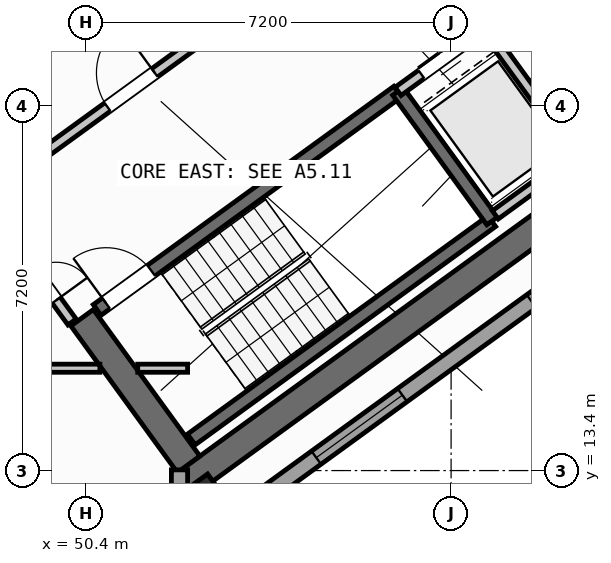
"""IFC4 building model, lengths in metres.
Left out: names, types, materials, properties, quantities, classifications, styles, units other than length and angle.
Written with IfcOpenShell. Run it as: python <this file> out.ifc"""

import sys

from ifc_helpers import new_model, si_unit, direction, frame, frame_2d, origin, origin_2d, place, context, subcontext, project, spatial, rectangle, hollow_rectangle, extrude, source, transform, mapped, element, fill, save


model = new_model("IFC4")
c1 = context("Model", 3, precision=1e-05, world=origin(), true_north=direction((0.0, 1.0)))
c2 = subcontext(c1, "Body", "Model", "MODEL_VIEW")
j1 = project(units=[si_unit("LENGTHUNIT", "METRE"), si_unit("PLANEANGLEUNIT", "RADIAN")], contexts=[c1])
p1 = place(None, origin())
s1 = spatial("IfcSite", under=j1, at=p1, CompositionType="ELEMENT")
p2 = place(p1, origin())
s2 = spatial("IfcBuilding", under=s1, at=p2, CompositionType="ELEMENT")
p3 = place(p2, frame((0.0, 0.0, 187.8)))
s3 = spatial("IfcBuildingStorey", under=s2, at=p3, CompositionType="ELEMENT", Elevation=187.8)
p4 = place(p3, frame((52.359, 13.14, 0.0), z_axis=(0.0, 0.0, 1.0), x_axis=(0.809014896919, 0.587788139183, 0.0)))
e1 = element("IfcWall", 1, at=p4, inside=s3, PredefinedType="SHEAR", context=c2, shape_type="SweptSolid", body=[
    extrude(rectangle(XDim=12.34, YDim=0.55, at=frame_2d((6.17, 0.0))), origin(), (0.0, 0.0, 1.0), 3.35),
])
p5 = place(p3, frame((52.42, 13.524, 0.0), z_axis=(0.0, 0.0, 1.0), x_axis=(-0.587802113096, 0.809004744015, 0.0)))
e2 = element("IfcWall", 2, at=p5, inside=s3, PredefinedType="SHEAR", context=c2, shape_type="SweptSolid", body=[
    extrude(rectangle(XDim=3.575, YDim=0.55, at=frame_2d((1.788, 0.0))), origin(), (0.0, 0.0, 1.0), 3.35),
])
m1 = source(origin(), c2, "Body", "SweptSolid", [
    extrude(hollow_rectangle(XDim=0.8, YDim=0.8, WallThickness=0.032, at=origin_2d()), origin(), (0.0, 0.0, 1.0), 3.6),
])
p6 = place(p3, frame((52.705, 12.773, 0.0), z_axis=(0.0, 0.0, 1.0), x_axis=(0.809016994375, 0.587785252292, 0.0)))
e3 = element("IfcColumn", 3, at=p6, inside=s3, PredefinedType="COLUMN", context=c2, shape_type="MappedRepresentation", body=[
    mapped(m1, transform((0.0, 0.0, 0.0), scale=1.0)),
])
p7 = place(p3, frame((67.454, 22.747, 0.0), z_axis=(0.0, 0.0, 1.0), x_axis=(-0.809021120468, -0.587779573171, 0.0)))
e4 = element("IfcWall", 4, at=p7, inside=s3, PredefinedType="STANDARD", context=c2, shape_type="SweptSolid", body=[
    extrude(rectangle(XDim=17.588, YDim=0.32, at=frame_2d((8.794, 0.0))), origin(), (0.0, 0.0, 1.0), 3.35),
])
p8 = place(p7, frame((1.624, 0.0, 0.0)))
e5 = element("IfcOpeningElement", 5, at=p8, cuts=e4, PredefinedType="OPENING", context=c2, shape_type="SweptSolid", body=[
    extrude(rectangle(XDim=1.05, YDim=2.15, at=frame_2d((0.525, 1.075))), frame((0.0, 0.17, 0.0), z_axis=(0.0, -1.0, 0.0), x_axis=(1.0, 0.0, 0.0)), (0.0, 0.0, 1.0), 0.34),
])
p9 = place(p7, frame((8.119, 0.0, 0.8)))
e6 = element("IfcOpeningElement", 6, at=p9, cuts=e4, PredefinedType="OPENING", context=c2, shape_type="SweptSolid", body=[
    extrude(rectangle(XDim=2.1, YDim=1.55, at=frame_2d((1.05, 0.775))), frame((0.0, 0.17, 0.0), z_axis=(0.0, -1.0, 0.0), x_axis=(1.0, 0.0, 0.0)), (0.0, 0.0, 1.0), 0.34),
])
p10 = place(p7, frame((13.369, 0.0, 0.8)))
e7 = element("IfcOpeningElement", 7, at=p10, cuts=e4, PredefinedType="OPENING", context=c2, shape_type="SweptSolid", body=[
    extrude(rectangle(XDim=2.1, YDim=1.55, at=frame_2d((1.05, 0.775))), frame((0.0, 0.17, 0.0), z_axis=(0.0, -1.0, 0.0), x_axis=(1.0, 0.0, 0.0)), (0.0, 0.0, 1.0), 0.34),
])
p11 = place(p3, frame((52.24, 13.414, 0.0), z_axis=(0.0, 0.0, 1.0), x_axis=(0.0, -1.0, 0.0)))
e8 = element("IfcWall", 8, at=p11, inside=s3, PredefinedType="STANDARD", context=c2, shape_type="SweptSolid", body=[
    extrude(rectangle(XDim=9.948, YDim=0.32, at=frame_2d((4.974, 0.0))), origin(), (0.0, 0.0, 1.0), 3.35),
])
p12 = place(p11, frame((2.296, 0.0, 0.8)))
e9 = element("IfcOpeningElement", 9, at=p12, cuts=e8, PredefinedType="OPENING", context=c2, shape_type="SweptSolid", body=[
    extrude(rectangle(XDim=2.1, YDim=1.55, at=frame_2d((1.05, 0.775))), frame((0.0, 0.17, 0.0), z_axis=(0.0, -1.0, 0.0), x_axis=(1.0, 0.0, 0.0)), (0.0, 0.0, 1.0), 0.34),
])
p13 = place(p11, frame((7.033, 0.0, 0.85)))
e10 = element("IfcOpeningElement", 10, at=p13, cuts=e8, PredefinedType="OPENING", context=c2, shape_type="SweptSolid", body=[
    extrude(rectangle(XDim=1.8, YDim=1.5, at=frame_2d((0.9, 0.75))), frame((0.0, 0.17, 0.0), z_axis=(0.0, -1.0, 0.0), x_axis=(1.0, 0.0, 0.0)), (0.0, 0.0, 1.0), 0.34),
])
p14 = place(p3, frame((52.472, 14.013, 0.0), z_axis=(0.0, 0.0, 1.0), x_axis=(0.809028366311, 0.587769599847, 0.0)))
e11 = element("IfcWall", 11, at=p14, inside=s3, PredefinedType="SHEAR", context=c2, shape_type="SweptSolid", body=[
    extrude(rectangle(XDim=7.33, YDim=0.26, at=frame_2d((3.665, 0.0))), origin(), (0.0, 0.0, 1.0), 3.35),
])
p15 = place(p3, frame((50.615, 16.57, 0.0), z_axis=(0.0, 0.0, 1.0), x_axis=(0.809028366311, 0.587769599847, 0.0)))
e12 = element("IfcWall", 12, at=p15, inside=s3, PredefinedType="SHEAR", context=c2, shape_type="SweptSolid", body=[
    extrude(rectangle(XDim=7.33, YDim=0.26, at=frame_2d((3.665, 0.0))), origin(), (0.0, 0.0, 1.0), 3.35),
])
p16 = place(p15, frame((0.22, 0.0, 0.0)))
e13 = element("IfcOpeningElement", 13, at=p16, cuts=e12, PredefinedType="OPENING", context=c2, shape_type="SweptSolid", body=[
    extrude(rectangle(XDim=1.1, YDim=2.1, at=frame_2d((0.55, 1.05))), frame((0.0, 0.14, 0.0), z_axis=(0.0, -1.0, 0.0), x_axis=(1.0, 0.0, 0.0)), (0.0, 0.0, 1.0), 0.28),
])
p17 = place(p3, frame((58.41, 18.327, 0.0), z_axis=(0.0, 0.0, 1.0), x_axis=(-0.58776738483, 0.809029975545, 0.0)))
e14 = element("IfcWall", 14, at=p17, inside=s3, PredefinedType="SHEAR", context=c2, shape_type="SweptSolid", body=[
    extrude(rectangle(XDim=3.16, YDim=0.26, at=frame_2d((1.58, 0.0))), origin(), (0.0, 0.0, 1.0), 3.35),
])
p18 = place(p3, frame((47.065, 21.407, 0.0), z_axis=(0.0, 0.0, 1.0), x_axis=(0.809032984992, 0.587763242466, 0.0)))
e15 = element("IfcWall", 15, at=p18, inside=s3, PredefinedType="STANDARD", context=c2, shape_type="SweptSolid", body=[
    extrude(rectangle(XDim=3.448, YDim=0.2, at=frame_2d((1.724, 0.0))), origin(), (0.0, 0.0, 1.0), 3.34),
])
p19 = place(p18, frame((0.458, 0.0, 0.0)))
e16 = element("IfcOpeningElement", 16, at=p19, cuts=e15, PredefinedType="OPENING", context=c2, shape_type="SweptSolid", body=[
    extrude(rectangle(XDim=1.3, YDim=2.2, at=frame_2d((0.65, 1.1))), frame((0.0, 0.11, 0.0), z_axis=(0.0, -1.0, 0.0), x_axis=(1.0, 0.0, 0.0)), (0.0, 0.0, 1.0), 0.22),
])
p20 = place(p3, frame((48.758, 19.077, 0.0), z_axis=(0.0, 0.0, 1.0), x_axis=(0.809005065155, 0.587801671104, 0.0)))
e17 = element("IfcWall", 17, at=p20, inside=s3, PredefinedType="STANDARD", context=c2, shape_type="SweptSolid", body=[
    extrude(rectangle(XDim=5.768, YDim=0.2, at=frame_2d((2.884, 0.0))), origin(), (0.0, 0.0, 1.0), 3.34),
])
p21 = place(p20, frame((2.548, 0.0, 0.0)))
e18 = element("IfcOpeningElement", 18, at=p21, cuts=e17, PredefinedType="OPENING", context=c2, shape_type="SweptSolid", body=[
    extrude(rectangle(XDim=1.15, YDim=2.1, at=frame_2d((0.575, 1.05))), frame((0.0, 0.11, 0.0), z_axis=(0.0, -1.0, 0.0), x_axis=(1.0, 0.0, 0.0)), (0.0, 0.0, 1.0), 0.22),
])
p22 = place(p3, frame((56.553, 20.884, 0.0), z_axis=(0.0, 0.0, 1.0), x_axis=(0.809023564264, 0.58777620951, 0.0)))
e19 = element("IfcWall", 19, at=p22, inside=s3, PredefinedType="STANDARD", context=c2, shape_type="SweptSolid", body=[
    extrude(rectangle(XDim=3.818, YDim=0.2, at=frame_2d((1.909, 0.0))), origin(), (0.0, 0.0, 1.0), 3.34),
])
p23 = place(p22, frame((0.57, 0.0, 0.0)))
e20 = element("IfcOpeningElement", 20, at=p23, cuts=e19, PredefinedType="OPENING", context=c2, shape_type="SweptSolid", body=[
    extrude(rectangle(XDim=1.1, YDim=2.15, at=frame_2d((0.55, 1.075))), frame((0.0, 0.11, 0.0), z_axis=(0.0, -1.0, 0.0), x_axis=(1.0, 0.0, 0.0)), (0.0, 0.0, 1.0), 0.22),
])
p24 = place(p22, frame((2.65, 0.0, 0.0)))
e21 = element("IfcOpeningElement", 21, at=p24, cuts=e19, PredefinedType="OPENING", context=c2, shape_type="SweptSolid", body=[
    extrude(rectangle(XDim=0.86, YDim=2.05, at=frame_2d((0.43, 1.025))), frame((0.0, 0.11, 0.0), z_axis=(0.0, -1.0, 0.0), x_axis=(1.0, 0.0, 0.0)), (0.0, 0.0, 1.0), 0.22),
])
p25 = place(p3, frame((60.067, 19.655, 0.0), z_axis=(0.0, 0.0, 1.0), x_axis=(-0.587800520745, 0.809005900975, 0.0)))
e22 = element("IfcWall", 22, at=p25, inside=s3, PredefinedType="STANDARD", context=c2, shape_type="SweptSolid", body=[
    extrude(rectangle(XDim=2.66, YDim=0.2, at=frame_2d((1.33, 0.0))), origin(), (0.0, 0.0, 1.0), 3.34),
])
p26 = place(p3, frame((58.472, 18.447, 0.0), z_axis=(0.0, 0.0, 1.0), x_axis=(0.809018631237, 0.587782999339, 0.0)))
e23 = element("IfcWall", 23, at=p26, inside=s3, PredefinedType="STANDARD", context=c2, shape_type="SweptSolid", body=[
    extrude(rectangle(XDim=3.698, YDim=0.2, at=frame_2d((1.849, 0.0))), origin(), (0.0, 0.0, 1.0), 3.34),
])
p27 = place(p3, frame((35.237, 15.42, 0.0), z_axis=(0.0, 0.0, 1.0), x_axis=(1.0, 0.0, 0.0)))
e24 = element("IfcWall", 24, at=p27, inside=s3, PredefinedType="PARTITIONING", context=c2, shape_type="SweptSolid", body=[
    extrude(rectangle(XDim=15.432, YDim=0.16, at=frame_2d((7.716, 0.0))), origin(), (0.0, 0.0, 1.0), 3.34),
])
p28 = place(p27, frame((0.969, 0.0, 0.0)))
e25 = element("IfcOpeningElement", 25, at=p28, cuts=e24, PredefinedType="OPENING", context=c2, shape_type="SweptSolid", body=[
    extrude(rectangle(XDim=1.0, YDim=2.1, at=frame_2d((0.5, 1.05))), frame((0.0, 0.09, 0.0), z_axis=(0.0, -1.0, 0.0), x_axis=(1.0, 0.0, 0.0)), (0.0, 0.0, 1.0), 0.18),
])
p29 = place(p27, frame((8.799, 0.0, 0.0)))
e26 = element("IfcOpeningElement", 26, at=p29, cuts=e24, PredefinedType="OPENING", context=c2, shape_type="SweptSolid", body=[
    extrude(rectangle(XDim=1.0, YDim=2.1, at=frame_2d((0.5, 1.05))), frame((0.0, 0.09, 0.0), z_axis=(0.0, -1.0, 0.0), x_axis=(1.0, 0.0, 0.0)), (0.0, 0.0, 1.0), 0.18),
])
p30 = place(p3, frame((51.416, 15.42, 0.0), z_axis=(0.0, 0.0, 1.0), x_axis=(1.0, 0.0, 0.0)))
e27 = element("IfcWall", 27, at=p30, inside=s3, PredefinedType="PARTITIONING", context=c2, shape_type="SweptSolid", body=[
    extrude(rectangle(XDim=0.984, YDim=0.16, at=frame_2d((0.492, 0.0))), origin(), (0.0, 0.0, 1.0), 3.34),
])
p31 = place(p3, frame((50.119, 16.333, 0.0), z_axis=(0.0, 0.0, 1.0), x_axis=(-0.587749856981, 0.809042709391, 0.0)))
e28 = element("IfcWall", 28, at=p31, inside=s3, PredefinedType="STANDARD", context=c2, shape_type="SweptSolid", body=[
    extrude(rectangle(XDim=2.96, YDim=0.2, at=frame_2d((1.48, 0.0))), origin(), (0.0, 0.0, 1.0), 3.34),
])
p32 = place(p31, frame((0.53, 0.0, 0.0)))
e29 = element("IfcOpeningElement", 29, at=p32, cuts=e28, PredefinedType="OPENING", context=c2, shape_type="SweptSolid", body=[
    extrude(rectangle(XDim=1.5, YDim=2.15, at=frame_2d((0.75, 1.075))), frame((0.0, 0.11, 0.0), z_axis=(0.0, -1.0, 0.0), x_axis=(1.0, 0.0, 0.0)), (0.0, 0.0, 1.0), 0.22),
])
m2 = source(origin(), c2, "Body", "SweptSolid", [
    extrude(rectangle(XDim=2.1, YDim=1.55, at=frame_2d((1.05, 0.775))), frame((0.0, 0.03, 0.0), z_axis=(0.0, -1.0, 0.0), x_axis=(1.0, 0.0, 0.0)), (0.0, 0.0, 1.0), 0.06),
])
p33 = place(p9, origin())
e30 = element("IfcWindow", 30, at=p33, inside=s3, PartitioningType="SINGLE_PANEL", PredefinedType="WINDOW", context=c2, shape_type="MappedRepresentation", body=[
    mapped(m2, transform((0.0, 0.0, 0.0), scale=1.0)),
])
fill(e6, e30)
p34 = place(p10, origin())
e31 = element("IfcWindow", 31, at=p34, inside=s3, PartitioningType="SINGLE_PANEL", PredefinedType="WINDOW", context=c2, shape_type="MappedRepresentation", body=[
    mapped(m2, transform((0.0, 0.0, 0.0), scale=1.0)),
])
fill(e7, e31)
m3 = source(origin(), c2, "Body", "SweptSolid", [
    extrude(rectangle(XDim=1.1, YDim=2.1, at=frame_2d((0.55, 1.05))), frame((0.0, 0.025, 0.0), z_axis=(0.0, -1.0, 0.0), x_axis=(1.0, 0.0, 0.0)), (0.0, 0.0, 1.0), 0.05),
])
p35 = place(p16, origin())
e32 = element("IfcDoor", 32, at=p35, inside=s3, OperationType="SINGLE_SWING_LEFT", PredefinedType="DOOR", context=c2, shape_type="MappedRepresentation", body=[
    mapped(m3, transform((0.0, 0.0, 0.0), scale=1.0)),
])
fill(e13, e32)
m4 = source(origin(), c2, "Body", "SweptSolid", [
    extrude(rectangle(XDim=1.15, YDim=2.1, at=frame_2d((0.575, 1.05))), frame((0.0, 0.025, 0.0), z_axis=(0.0, -1.0, 0.0), x_axis=(1.0, 0.0, 0.0)), (0.0, 0.0, 1.0), 0.05),
])
p36 = place(p21, origin())
e33 = element("IfcDoor", 33, at=p36, inside=s3, OperationType="SINGLE_SWING_RIGHT", PredefinedType="DOOR", context=c2, shape_type="MappedRepresentation", body=[
    mapped(m4, transform((0.0, 0.0, 0.0), scale=1.0)),
])
fill(e18, e33)
m5 = source(origin(), c2, "Body", "SweptSolid", [
    extrude(rectangle(XDim=1.1, YDim=2.15, at=frame_2d((0.55, 1.075))), frame((0.0, 0.025, 0.0), z_axis=(0.0, -1.0, 0.0), x_axis=(1.0, 0.0, 0.0)), (0.0, 0.0, 1.0), 0.05),
])
p37 = place(p23, origin())
e34 = element("IfcDoor", 34, at=p37, inside=s3, OperationType="DOUBLE_DOOR_SLIDING", PredefinedType="DOOR", context=c2, shape_type="MappedRepresentation", body=[
    mapped(m5, transform((0.0, 0.0, 0.0), scale=1.0)),
])
fill(e20, e34)
m6 = source(origin(), c2, "Body", "SweptSolid", [
    extrude(rectangle(XDim=1.5, YDim=2.15, at=frame_2d((0.75, 1.075))), frame((0.0, 0.025, 0.0), z_axis=(0.0, -1.0, 0.0), x_axis=(1.0, 0.0, 0.0)), (0.0, 0.0, 1.0), 0.05),
])
p38 = place(p32, frame((1.5, 0.0, 0.0), z_axis=(0.0, 0.0, 1.0), x_axis=(-1.0, 0.0, 0.0)))
e35 = element("IfcDoor", 35, at=p38, inside=s3, OperationType="DOUBLE_DOOR_SINGLE_SWING", PredefinedType="DOOR", context=c2, shape_type="MappedRepresentation", body=[
    mapped(m6, transform((0.0, 0.0, 0.0), scale=1.0)),
])
fill(e29, e35)
save(model, sys.argv[1])
